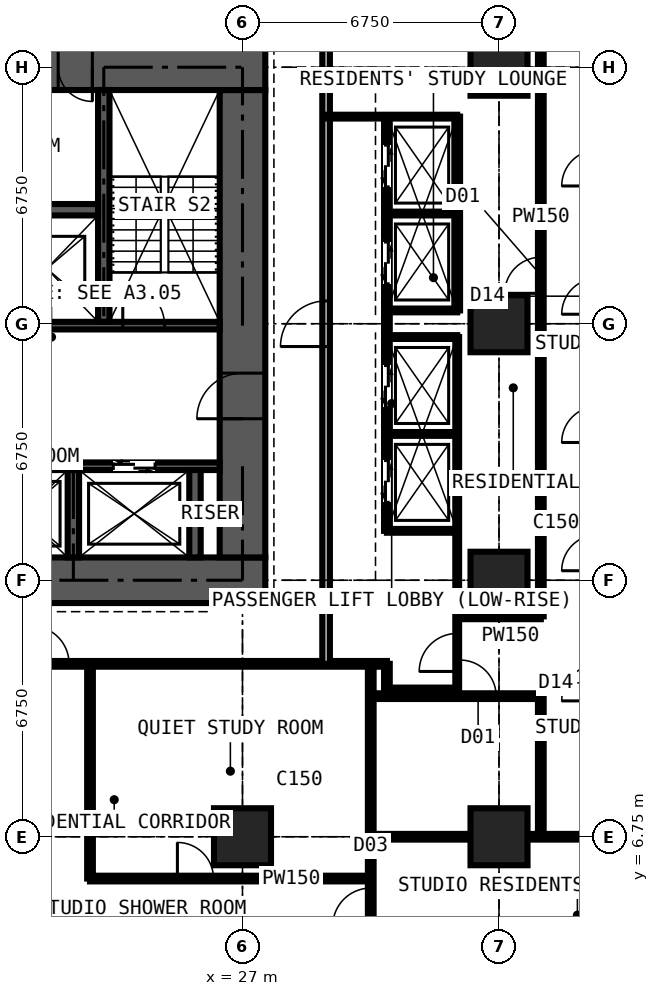
"""IFC4 building model, lengths in metres.
Left out: names, types, materials, properties, quantities, classifications, styles, units other than length and angle.
Written with IfcOpenShell. Run it as: python <this file> out.ifc"""

import sys

from ifc_helpers import new_model, si_unit, direction, frame, frame_2d, origin, origin_2d, place, context, subcontext, project, spatial, rectangle, extrude, element, fill, save


model = new_model("IFC4")
c1 = context("Model", 3, precision=1e-05, world=origin(), true_north=direction((0.0, 1.0)))
c2 = subcontext(c1, "Body", "Model", "MODEL_VIEW")
j1 = project(units=[si_unit("LENGTHUNIT", "METRE"), si_unit("PLANEANGLEUNIT", "RADIAN")], contexts=[c1])
p1 = place(None, origin())
s1 = spatial("IfcSite", under=j1, at=p1, CompositionType="ELEMENT")
p2 = place(p1, origin())
s2 = spatial("IfcBuilding", under=s1, at=p2, CompositionType="ELEMENT")
p3 = place(p2, frame((0.0, 0.0, 130.5)))
s3 = spatial("IfcBuildingStorey", under=s2, at=p3, CompositionType="ELEMENT", Elevation=130.5)
for number, where, z_axis, x_axis in (
    (1, (27.0, 6.75, 0.0), (0.0, 0.0, 1.0), (1.0, 0.0, 0.0)),
    (2, (33.75, 6.75, 0.0), (0.0, 0.0, 1.0), (1.0, 0.0, 0.0)),
    (3, (33.75, 13.5, 0.0), (0.0, 0.0, 1.0), (1.0, 0.0, 0.0)),
    (4, (33.75, 20.25, 0.0), (0.0, 0.0, 1.0), (1.0, 0.0, 0.0)),
    (5, (33.75, 27.0, 0.0), (0.0, 0.0, 1.0), (1.0, 0.0, 0.0)),
):
    element("IfcColumn", number, at=place(p3, frame(where, z_axis=z_axis, x_axis=x_axis)), inside=s3, PredefinedType="COLUMN", context=c2, shape_type="SweptSolid", body=[
        extrude(rectangle(XDim=1.5, YDim=1.5, at=origin_2d()), origin(), (0.0, 0.0, 1.0), 3.6),
    ])
p4 = place(p3, frame((12.9, 13.5, 0.0), z_axis=(0.0, 0.0, 1.0), x_axis=(1.0, 0.0, 0.0)))
e6 = element("IfcWall", 6, at=p4, inside=s3, PredefinedType="SHEAR", context=c2, shape_type="SweptSolid", body=[
    extrude(rectangle(XDim=14.7, YDim=1.2, at=frame_2d((7.35, 0.0))), origin(), (0.0, 0.0, 1.0), 3.6),
])
p5 = place(p3, frame((27.0, 14.1, 0.0), z_axis=(0.0, 0.0, 1.0), x_axis=(0.0, 1.0, 0.0)))
e7 = element("IfcWall", 7, at=p5, inside=s3, PredefinedType="SHEAR", context=c2, shape_type="SweptSolid", body=[
    extrude(rectangle(XDim=12.3, YDim=1.2, at=frame_2d((6.15, 0.0))), origin(), (0.0, 0.0, 1.0), 3.6),
])
p6 = place(p5, frame((3.65, 0.0, 0.0)))
e8 = element("IfcOpeningElement", 8, at=p6, cuts=e7, PredefinedType="OPENING", context=c2, shape_type="SweptSolid", body=[
    extrude(rectangle(XDim=1.2, YDim=2.2, at=frame_2d((0.6, 1.1))), frame((0.0, 0.61, 0.0), z_axis=(0.0, -1.0, 0.0), x_axis=(1.0, 0.0, 0.0)), (0.0, 0.0, 1.0), 1.22),
])
p7 = place(p3, frame((27.6, 27.0, 0.0), z_axis=(0.0, 0.0, 1.0), x_axis=(-1.0, 0.0, 0.0)))
e9 = element("IfcWall", 9, at=p7, inside=s3, PredefinedType="SHEAR", context=c2, shape_type="SweptSolid", body=[
    extrude(rectangle(XDim=14.7, YDim=1.2, at=frame_2d((7.35, 0.0))), origin(), (0.0, 0.0, 1.0), 3.6),
])
p8 = place(p7, frame((4.55, 0.0, 0.0)))
e10 = element("IfcOpeningElement", 10, at=p8, cuts=e9, PredefinedType="OPENING", context=c2, shape_type="SweptSolid", body=[
    extrude(rectangle(XDim=0.9, YDim=2.2, at=frame_2d((0.45, 1.1))), frame((0.0, 0.61, 0.0), z_axis=(0.0, -1.0, 0.0), x_axis=(1.0, 0.0, 0.0)), (0.0, 0.0, 1.0), 1.22),
])
p9 = place(p7, frame((7.525, 0.0, 0.0)))
e11 = element("IfcOpeningElement", 11, at=p9, cuts=e9, PredefinedType="OPENING", context=c2, shape_type="SweptSolid", body=[
    extrude(rectangle(XDim=1.0, YDim=2.2, at=frame_2d((0.5, 1.1))), frame((0.0, 0.61, 0.0), z_axis=(0.0, -1.0, 0.0), x_axis=(1.0, 0.0, 0.0)), (0.0, 0.0, 1.0), 1.22),
])
p10 = place(p3, frame((14.1, 16.5, 0.0), z_axis=(0.0, 0.0, 1.0), x_axis=(1.0, 0.0, 0.0)))
e12 = element("IfcWall", 12, at=p10, inside=s3, PredefinedType="SHEAR", context=c2, shape_type="SweptSolid", body=[
    extrude(rectangle(XDim=12.3, YDim=0.2, at=frame_2d((6.15, 0.0))), origin(), (0.0, 0.0, 1.0), 3.6),
])
p11 = place(p10, frame((0.9, 0.0, 0.0)))
e13 = element("IfcOpeningElement", 13, at=p11, cuts=e12, PredefinedType="OPENING", context=c2, shape_type="SweptSolid", body=[
    extrude(rectangle(XDim=1.1, YDim=2.2, at=frame_2d((0.55, 1.1))), frame((0.0, 0.11, 0.0), z_axis=(0.0, -1.0, 0.0), x_axis=(1.0, 0.0, 0.0)), (0.0, 0.0, 1.0), 0.22),
])
p12 = place(p10, frame((9.5, 0.0, 0.0)))
e14 = element("IfcOpeningElement", 14, at=p12, cuts=e12, PredefinedType="OPENING", context=c2, shape_type="SweptSolid", body=[
    extrude(rectangle(XDim=1.1, YDim=2.2, at=frame_2d((0.55, 1.1))), frame((0.0, 0.11, 0.0), z_axis=(0.0, -1.0, 0.0), x_axis=(1.0, 0.0, 0.0)), (0.0, 0.0, 1.0), 0.22),
])
p13 = place(p3, frame((14.1, 20.2, 0.0), z_axis=(0.0, 0.0, 1.0), x_axis=(1.0, 0.0, 0.0)))
e15 = element("IfcWall", 15, at=p13, inside=s3, PredefinedType="SHEAR", context=c2, shape_type="SweptSolid", body=[
    extrude(rectangle(XDim=12.3, YDim=0.2, at=frame_2d((6.15, 0.0))), origin(), (0.0, 0.0, 1.0), 3.6),
])
p14 = place(p13, frame((0.35, 0.0, 0.0)))
e16 = element("IfcOpeningElement", 16, at=p14, cuts=e15, PredefinedType="OPENING", context=c2, shape_type="SweptSolid", body=[
    extrude(rectangle(XDim=1.1, YDim=2.2, at=frame_2d((0.55, 1.1))), frame((0.0, 0.11, 0.0), z_axis=(0.0, -1.0, 0.0), x_axis=(1.0, 0.0, 0.0)), (0.0, 0.0, 1.0), 0.22),
])
p15 = place(p13, frame((9.75, 0.0, 0.0)))
e17 = element("IfcOpeningElement", 17, at=p15, cuts=e15, PredefinedType="OPENING", context=c2, shape_type="SweptSolid", body=[
    extrude(rectangle(XDim=1.1, YDim=2.2, at=frame_2d((0.55, 1.1))), frame((0.0, 0.11, 0.0), z_axis=(0.0, -1.0, 0.0), x_axis=(1.0, 0.0, 0.0)), (0.0, 0.0, 1.0), 0.22),
])
p16 = place(p3, frame((23.35, 20.3, 0.0), z_axis=(0.0, 0.0, 1.0), x_axis=(0.0, 1.0, 0.0)))
e18 = element("IfcWall", 18, at=p16, inside=s3, PredefinedType="SHEAR", context=c2, shape_type="SweptSolid", body=[
    extrude(rectangle(XDim=6.1, YDim=0.3, at=frame_2d((3.05, 0.0))), origin(), (0.0, 0.0, 1.0), 3.6),
])
p17 = place(p3, frame((17.3, 23.25, 0.0), z_axis=(0.0, 0.0, 1.0), x_axis=(1.0, 0.0, 0.0)))
e19 = element("IfcWall", 19, at=p17, inside=s3, PredefinedType="SHEAR", context=c2, shape_type="SweptSolid", body=[
    extrude(rectangle(XDim=5.9, YDim=0.3, at=frame_2d((2.95, 0.0))), origin(), (0.0, 0.0, 1.0), 3.6),
])
for number, where, z_axis, x_axis in (
    (20, (22.55, 14.1, 0.0), (0.0, 0.0, 1.0), (0.0, 1.0, 0.0)),
    (21, (25.75, 14.1, 0.0), (0.0, 0.0, 1.0), (0.0, 1.0, 0.0)),
):
    element("IfcWall", number, at=place(p3, frame(where, z_axis=z_axis, x_axis=x_axis)), inside=s3, PredefinedType="SHEAR", context=c2, shape_type="SweptSolid", body=[
        extrude(rectangle(XDim=2.3, YDim=0.3, at=frame_2d((1.15, 0.0))), origin(), (0.0, 0.0, 1.0), 3.6),
    ])
p18 = place(p3, frame((10.125, 11.3, 0.0), z_axis=(0.0, 0.0, 1.0), x_axis=(1.0, 0.0, 0.0)))
e22 = element("IfcWall", 22, at=p18, inside=s3, PredefinedType="PARTITIONING", context=c2, shape_type="SweptSolid", body=[
    extrude(rectangle(XDim=20.675, YDim=0.15, at=frame_2d((10.337, 0.0))), origin(), (0.0, 0.0, 1.0), 3.375),
])
p19 = place(p18, frame((5.2, 0.0, 0.0)))
e23 = element("IfcOpeningElement", 23, at=p19, cuts=e22, PredefinedType="OPENING", context=c2, shape_type="SweptSolid", body=[
    extrude(rectangle(XDim=1.0, YDim=2.2, at=frame_2d((0.5, 1.1))), frame((0.0, 0.085, 0.0), z_axis=(0.0, -1.0, 0.0), x_axis=(1.0, 0.0, 0.0)), (0.0, 0.0, 1.0), 0.17),
])
p20 = place(p18, frame((11.312, 0.0, 0.0)))
e24 = element("IfcOpeningElement", 24, at=p20, cuts=e22, PredefinedType="OPENING", context=c2, shape_type="SweptSolid", body=[
    extrude(rectangle(XDim=1.0, YDim=2.2, at=frame_2d((0.5, 1.1))), frame((0.0, 0.085, 0.0), z_axis=(0.0, -1.0, 0.0), x_axis=(1.0, 0.0, 0.0)), (0.0, 0.0, 1.0), 0.17),
])
p21 = place(p18, frame((3.225, 0.0, 0.0)))
e25 = element("IfcOpeningElement", 25, at=p21, cuts=e22, PredefinedType="OPENING", context=c2, shape_type="SweptSolid", body=[
    extrude(rectangle(XDim=0.95, YDim=2.2, at=frame_2d((0.475, 1.1))), frame((0.0, 0.085, 0.0), z_axis=(0.0, -1.0, 0.0), x_axis=(1.0, 0.0, 0.0)), (0.0, 0.0, 1.0), 0.17),
])
p22 = place(p3, frame((22.988, 5.65, 0.0), z_axis=(0.0, 0.0, 1.0), x_axis=(1.0, 0.0, 0.0)))
e26 = element("IfcWall", 26, at=p22, inside=s3, PredefinedType="PARTITIONING", context=c2, shape_type="SweptSolid", body=[
    extrude(rectangle(XDim=7.387, YDim=0.15, at=frame_2d((3.694, 0.0))), origin(), (0.0, 0.0, 1.0), 3.375),
])
p23 = place(p22, frame((2.3, 0.0, 0.0)))
e27 = element("IfcOpeningElement", 27, at=p23, cuts=e26, PredefinedType="OPENING", context=c2, shape_type="SweptSolid", body=[
    extrude(rectangle(XDim=0.95, YDim=2.2, at=frame_2d((0.475, 1.1))), frame((0.0, 0.085, 0.0), z_axis=(0.0, -1.0, 0.0), x_axis=(1.0, 0.0, 0.0)), (0.0, 0.0, 1.0), 0.17),
])
p24 = place(p3, frame((22.988, 5.65, 0.0), z_axis=(0.0, 0.0, 1.0), x_axis=(0.0, 1.0, 0.0)))
e28 = element("IfcWall", 28, at=p24, inside=s3, PredefinedType="PARTITIONING", context=c2, shape_type="SweptSolid", body=[
    extrude(rectangle(XDim=5.65, YDim=0.15, at=frame_2d((2.825, 0.0))), origin(), (0.0, 0.0, 1.0), 3.375),
])
p25 = place(p3, frame((29.2, 11.3, 0.0), z_axis=(0.0, 0.0, 1.0), x_axis=(0.0, 1.0, 0.0)))
e29 = element("IfcWall", 29, at=p25, inside=s3, PredefinedType="PARTITIONING", context=c2, shape_type="SweptSolid", body=[
    extrude(rectangle(XDim=17.9, YDim=0.2, at=frame_2d((8.95, 0.0))), origin(), (0.0, 0.0, 1.0), 3.375),
])
p26 = place(p25, frame((8.35, 0.0, 0.0)))
e30 = element("IfcOpeningElement", 30, at=p26, cuts=e29, PredefinedType="OPENING", context=c2, shape_type="SweptSolid", body=[
    extrude(rectangle(XDim=1.2, YDim=2.2, at=frame_2d((0.6, 1.1))), frame((0.0, 0.11, 0.0), z_axis=(0.0, -1.0, 0.0), x_axis=(1.0, 0.0, 0.0)), (0.0, 0.0, 1.0), 0.22),
])
p27 = place(p3, frame((29.2, 25.7, 0.0), z_axis=(0.0, 0.0, 1.0), x_axis=(1.0, 0.0, 0.0)))
e31 = element("IfcWall", 31, at=p27, inside=s3, PredefinedType="SHEAR", context=c2, shape_type="SweptSolid", body=[
    extrude(rectangle(XDim=3.45, YDim=0.1, at=frame_2d((1.725, 0.0))), origin(), (0.0, 0.0, 1.0), 3.375),
])
p28 = place(p3, frame((30.375, -0.734, 0.0), z_axis=(0.0, 0.0, 1.0), x_axis=(0.0, 1.0, 0.0)))
e32 = element("IfcWall", 32, at=p28, inside=s3, PredefinedType="PARTITIONING", context=c2, shape_type="SweptSolid", body=[
    extrude(rectangle(XDim=12.034, YDim=0.15, at=frame_2d((6.017, 0.0))), origin(), (0.0, 0.0, 1.0), 3.375),
])
p29 = place(p28, frame((5.134, 0.0, 0.0)))
e33 = element("IfcOpeningElement", 33, at=p29, cuts=e32, PredefinedType="OPENING", context=c2, shape_type="SweptSolid", body=[
    extrude(rectangle(XDim=1.0, YDim=2.2, at=frame_2d((0.5, 1.1))), frame((0.0, 0.085, 0.0), z_axis=(0.0, -1.0, 0.0), x_axis=(1.0, 0.0, 0.0)), (0.0, 0.0, 1.0), 0.17),
])
p30 = place(p3, frame((30.375, 6.75, 0.0), z_axis=(0.0, 0.0, 1.0), x_axis=(1.0, 0.0, 0.0)))
e34 = element("IfcWall", 34, at=p30, inside=s3, PredefinedType="PARTITIONING", context=c2, shape_type="SweptSolid", body=[
    extrude(rectangle(XDim=5.975, YDim=0.15, at=frame_2d((2.988, 0.0))), origin(), (0.0, 0.0, 1.0), 2.877),
])
p31 = place(p3, frame((30.375, 10.45, 0.0), z_axis=(0.0, 0.0, 1.0), x_axis=(1.0, 0.0, 0.0)))
e35 = element("IfcWall", 35, at=p31, inside=s3, PredefinedType="PARTITIONING", context=c2, shape_type="SweptSolid", body=[
    extrude(rectangle(XDim=4.475, YDim=0.15, at=frame_2d((2.238, 0.0))), origin(), (0.0, 0.0, 1.0), 3.375),
])
p32 = place(p31, frame((2.35, 0.0, 0.0)))
e36 = element("IfcOpeningElement", 36, at=p32, cuts=e35, PredefinedType="OPENING", context=c2, shape_type="SweptSolid", body=[
    extrude(rectangle(XDim=0.95, YDim=2.2, at=frame_2d((0.475, 1.1))), frame((0.0, 0.085, 0.0), z_axis=(0.0, -1.0, 0.0), x_axis=(1.0, 0.0, 0.0)), (0.0, 0.0, 1.0), 0.17),
])
p33 = place(p3, frame((30.8, 10.6, 0.0), z_axis=(0.0, 0.0, 1.0), x_axis=(0.0, 1.0, 0.0)))
e37 = element("IfcWall", 37, at=p33, inside=s3, PredefinedType="PARTITIONING", context=c2, shape_type="SweptSolid", body=[
    extrude(rectangle(XDim=0.7, YDim=0.15, at=frame_2d((0.35, 0.0))), origin(), (0.0, 0.0, 1.0), 3.375),
])
p34 = place(p3, frame((30.8, 10.6, 0.0), z_axis=(0.0, 0.0, 1.0), x_axis=(1.0, 0.0, 0.0)))
e38 = element("IfcWall", 38, at=p34, inside=s3, PredefinedType="PARTITIONING", context=c2, shape_type="SweptSolid", body=[
    extrude(rectangle(XDim=1.85, YDim=0.15, at=frame_2d((0.925, 0.0))), origin(), (0.0, 0.0, 1.0), 3.375),
])
p35 = place(p3, frame((30.8, 14.8, 0.0), z_axis=(0.0, 0.0, 1.0), x_axis=(0.0, 1.0, 0.0)))
e39 = element("IfcWall", 39, at=p35, inside=s3, PredefinedType="PARTITIONING", context=c2, shape_type="SweptSolid", body=[
    extrude(rectangle(XDim=10.9, YDim=0.15, at=frame_2d((5.45, 0.0))), origin(), (0.0, 0.0, 1.0), 3.375),
])
p36 = place(p35, frame((0.75, 0.0, 0.0)))
e40 = element("IfcOpeningElement", 40, at=p36, cuts=e39, PredefinedType="OPENING", context=c2, shape_type="SweptSolid", body=[
    extrude(rectangle(XDim=1.1, YDim=2.2, at=frame_2d((0.55, 1.1))), frame((0.0, 0.085, 0.0), z_axis=(0.0, -1.0, 0.0), x_axis=(1.0, 0.0, 0.0)), (0.0, 0.0, 1.0), 0.17),
])
p37 = place(p35, frame((3.25, 0.0, 0.0)))
e41 = element("IfcOpeningElement", 41, at=p37, cuts=e39, PredefinedType="OPENING", context=c2, shape_type="SweptSolid", body=[
    extrude(rectangle(XDim=1.1, YDim=2.2, at=frame_2d((0.55, 1.1))), frame((0.0, 0.085, 0.0), z_axis=(0.0, -1.0, 0.0), x_axis=(1.0, 0.0, 0.0)), (0.0, 0.0, 1.0), 0.17),
])
p38 = place(p35, frame((6.5, 0.0, 0.0)))
e42 = element("IfcOpeningElement", 42, at=p38, cuts=e39, PredefinedType="OPENING", context=c2, shape_type="SweptSolid", body=[
    extrude(rectangle(XDim=1.1, YDim=2.2, at=frame_2d((0.55, 1.1))), frame((0.0, 0.085, 0.0), z_axis=(0.0, -1.0, 0.0), x_axis=(1.0, 0.0, 0.0)), (0.0, 0.0, 1.0), 0.17),
])
p39 = place(p35, frame((9.05, 0.0, 0.0)))
e43 = element("IfcOpeningElement", 43, at=p39, cuts=e39, PredefinedType="OPENING", context=c2, shape_type="SweptSolid", body=[
    extrude(rectangle(XDim=1.1, YDim=2.2, at=frame_2d((0.55, 1.1))), frame((0.0, 0.085, 0.0), z_axis=(0.0, -1.0, 0.0), x_axis=(1.0, 0.0, 0.0)), (0.0, 0.0, 1.0), 0.17),
])
for number, where, z_axis, x_axis in (
    (44, (30.8, 14.8, 0.0), (0.0, 0.0, 1.0), (1.0, 0.0, 0.0)),
    (45, (30.8, 17.35, 0.0), (0.0, 0.0, 1.0), (1.0, 0.0, 0.0)),
    (46, (30.8, 19.9, 0.0), (0.0, 0.0, 1.0), (1.0, 0.0, 0.0)),
    (47, (30.8, 20.6, 0.0), (0.0, 0.0, 1.0), (1.0, 0.0, 0.0)),
    (48, (30.8, 23.15, 0.0), (0.0, 0.0, 1.0), (1.0, 0.0, 0.0)),
):
    element("IfcWall", number, at=place(p3, frame(where, z_axis=z_axis, x_axis=x_axis)), inside=s3, PredefinedType="SHEAR", context=c2, shape_type="SweptSolid", body=[
        extrude(rectangle(XDim=1.85, YDim=0.1, at=frame_2d((0.925, 0.0))), origin(), (0.0, 0.0, 1.0), 3.375),
    ])
p40 = place(p3, frame((32.65, 10.6, 0.0), z_axis=(0.0, 0.0, 1.0), x_axis=(0.0, 1.0, 0.0)))
e49 = element("IfcWall", 49, at=p40, inside=s3, PredefinedType="SHEAR", context=c2, shape_type="SweptSolid", body=[
    extrude(rectangle(XDim=9.3, YDim=0.1, at=frame_2d((4.65, 0.0))), origin(), (0.0, 0.0, 1.0), 3.375),
])
p41 = place(p40, frame((0.5, 0.0, 0.0)))
e50 = element("IfcOpeningElement", 50, at=p41, cuts=e49, PredefinedType="OPENING", context=c2, shape_type="SweptSolid", body=[
    extrude(rectangle(XDim=1.0, YDim=2.2, at=frame_2d((0.5, 1.1))), frame((0.0, 0.06, 0.0), z_axis=(0.0, -1.0, 0.0), x_axis=(1.0, 0.0, 0.0)), (0.0, 0.0, 1.0), 0.12),
])
p42 = place(p3, frame((32.65, 12.55, 0.0), z_axis=(0.0, 0.0, 1.0), x_axis=(1.0, 0.0, 0.0)))
e51 = element("IfcWall", 51, at=p42, inside=s3, PredefinedType="PARTITIONING", context=c2, shape_type="SweptSolid", body=[
    extrude(rectangle(XDim=2.2, YDim=0.15, at=frame_2d((1.1, 0.0))), origin(), (0.0, 0.0, 1.0), 3.375),
])
p43 = place(p3, frame((32.65, 20.6, 0.0), z_axis=(0.0, 0.0, 1.0), x_axis=(0.0, 1.0, 0.0)))
e52 = element("IfcWall", 52, at=p43, inside=s3, PredefinedType="PARTITIONING", context=c2, shape_type="SweptSolid", body=[
    extrude(rectangle(XDim=5.1, YDim=0.15, at=frame_2d((2.55, 0.0))), origin(), (0.0, 0.0, 1.0), 3.375),
])
p44 = place(p3, frame((34.85, 6.75, 0.0), z_axis=(0.0, 0.0, 1.0), x_axis=(0.0, 1.0, 0.0)))
e53 = element("IfcWall", 53, at=p44, inside=s3, PredefinedType="PARTITIONING", context=c2, shape_type="SweptSolid", body=[
    extrude(rectangle(XDim=3.7, YDim=0.15, at=frame_2d((1.85, 0.0))), origin(), (0.0, 0.0, 1.0), 3.375),
])
p45 = place(p3, frame((34.85, 12.55, 0.0), z_axis=(0.0, 0.0, 1.0), x_axis=(0.0, 1.0, 0.0)))
e54 = element("IfcWall", 54, at=p45, inside=s3, PredefinedType="PARTITIONING", context=c2, shape_type="SweptSolid", body=[
    extrude(rectangle(XDim=17.825, YDim=0.15, at=frame_2d((8.913, 0.0))), origin(), (0.0, 0.0, 1.0), 3.375),
])
p46 = place(p45, frame((8.5, 0.0, 0.0)))
e55 = element("IfcOpeningElement", 55, at=p46, cuts=e54, PredefinedType="OPENING", context=c2, shape_type="SweptSolid", body=[
    extrude(rectangle(XDim=0.95, YDim=2.2, at=frame_2d((0.475, 1.1))), frame((0.0, 0.085, 0.0), z_axis=(0.0, -1.0, 0.0), x_axis=(1.0, 0.0, 0.0)), (0.0, 0.0, 1.0), 0.17),
])
p47 = place(p12, origin())
e56 = element("IfcDoor", 56, at=p47, inside=s3, OperationType="DOUBLE_DOOR_SLIDING", PredefinedType="DOOR", context=c2, shape_type="SweptSolid", body=[
    extrude(rectangle(XDim=1.1, YDim=2.2, at=frame_2d((0.55, 1.1))), frame((0.0, 0.025, 0.0), z_axis=(0.0, -1.0, 0.0), x_axis=(1.0, 0.0, 0.0)), (0.0, 0.0, 1.0), 0.05),
])
fill(e14, e56)
p48 = place(p6, origin())
e57 = element("IfcDoor", 57, at=p48, inside=s3, OperationType="DOUBLE_DOOR_SINGLE_SWING", PredefinedType="DOOR", context=c2, shape_type="SweptSolid", body=[
    extrude(rectangle(XDim=1.2, YDim=2.2, at=frame_2d((0.6, 1.1))), frame((0.0, 0.025, 0.0), z_axis=(0.0, -1.0, 0.0), x_axis=(1.0, 0.0, 0.0)), (0.0, 0.0, 1.0), 0.05),
])
fill(e8, e57)
p49 = place(p8, origin())
e58 = element("IfcDoor", 58, at=p49, inside=s3, OperationType="SINGLE_SWING_LEFT", PredefinedType="DOOR", context=c2, shape_type="SweptSolid", body=[
    extrude(rectangle(XDim=0.9, YDim=2.2, at=frame_2d((0.45, 1.1))), frame((0.0, 0.4, 0.0), z_axis=(0.0, -1.0, 0.0), x_axis=(1.0, 0.0, 0.0)), (0.0, 0.0, 1.0), 0.8),
])
fill(e10, e58)
p50 = place(p15, origin())
e59 = element("IfcDoor", 59, at=p50, inside=s3, OperationType="SINGLE_SWING_LEFT", PredefinedType="DOOR", context=c2, shape_type="SweptSolid", body=[
    extrude(rectangle(XDim=1.1, YDim=2.2, at=frame_2d((0.55, 1.1))), frame((0.0, 0.025, 0.0), z_axis=(0.0, -1.0, 0.0), x_axis=(1.0, 0.0, 0.0)), (0.0, 0.0, 1.0), 0.05),
])
fill(e17, e59)
p51 = place(p20, origin())
e60 = element("IfcDoor", 60, at=p51, inside=s3, OperationType="SINGLE_SWING_LEFT", PredefinedType="DOOR", context=c2, shape_type="SweptSolid", body=[
    extrude(rectangle(XDim=1.0, YDim=2.2, at=frame_2d((0.5, 1.1))), frame((0.0, 0.025, 0.0), z_axis=(0.0, -1.0, 0.0), x_axis=(1.0, 0.0, 0.0)), (0.0, 0.0, 1.0), 0.05),
])
fill(e24, e60)
p52 = place(p23, origin())
e61 = element("IfcDoor", 61, at=p52, inside=s3, OperationType="SINGLE_SWING_LEFT", PredefinedType="DOOR", context=c2, shape_type="SweptSolid", body=[
    extrude(rectangle(XDim=0.95, YDim=2.2, at=frame_2d((0.475, 1.1))), frame((0.0, 0.025, 0.0), z_axis=(0.0, -1.0, 0.0), x_axis=(1.0, 0.0, 0.0)), (0.0, 0.0, 1.0), 0.05),
])
fill(e27, e61)
p53 = place(p29, origin())
e62 = element("IfcDoor", 62, at=p53, inside=s3, OperationType="SINGLE_SWING_LEFT", PredefinedType="DOOR", context=c2, shape_type="SweptSolid", body=[
    extrude(rectangle(XDim=1.0, YDim=2.2, at=frame_2d((0.5, 1.1))), frame((0.0, 0.025, 0.0), z_axis=(0.0, -1.0, 0.0), x_axis=(1.0, 0.0, 0.0)), (0.0, 0.0, 1.0), 0.05),
])
fill(e33, e62)
p54 = place(p41, origin())
e63 = element("IfcDoor", 63, at=p54, inside=s3, OperationType="SINGLE_SWING_LEFT", PredefinedType="DOOR", context=c2, shape_type="SweptSolid", body=[
    extrude(rectangle(XDim=1.0, YDim=2.2, at=frame_2d((0.5, 1.1))), frame((0.0, 0.025, 0.0), z_axis=(0.0, -1.0, 0.0), x_axis=(1.0, 0.0, 0.0)), (0.0, 0.0, 1.0), 0.05),
])
fill(e50, e63)
p55 = place(p46, origin())
e64 = element("IfcDoor", 64, at=p55, inside=s3, OperationType="SINGLE_SWING_LEFT", PredefinedType="DOOR", context=c2, shape_type="SweptSolid", body=[
    extrude(rectangle(XDim=0.95, YDim=2.2, at=frame_2d((0.475, 1.1))), frame((0.0, 0.025, 0.0), z_axis=(0.0, -1.0, 0.0), x_axis=(1.0, 0.0, 0.0)), (0.0, 0.0, 1.0), 0.05),
])
fill(e55, e64)
p56 = place(p32, origin())
e65 = element("IfcDoor", 65, at=p56, inside=s3, OperationType="SINGLE_SWING_LEFT", PredefinedType="DOOR", context=c2, shape_type="SweptSolid", body=[
    extrude(rectangle(XDim=0.95, YDim=2.2, at=frame_2d((0.475, 1.1))), frame((0.0, 0.025, 0.0), z_axis=(0.0, -1.0, 0.0), x_axis=(1.0, 0.0, 0.0)), (0.0, 0.0, 1.0), 0.05),
])
fill(e36, e65)
p57 = place(p36, origin())
e66 = element("IfcDoor", 66, at=p57, inside=s3, OperationType="DOUBLE_DOOR_SLIDING", PredefinedType="DOOR", context=c2, shape_type="SweptSolid", body=[
    extrude(rectangle(XDim=1.1, YDim=2.2, at=frame_2d((0.55, 1.1))), frame((0.0, 0.025, 0.0), z_axis=(0.0, -1.0, 0.0), x_axis=(1.0, 0.0, 0.0)), (0.0, 0.0, 1.0), 0.05),
])
fill(e40, e66)
p58 = place(p37, origin())
e67 = element("IfcDoor", 67, at=p58, inside=s3, OperationType="DOUBLE_DOOR_SLIDING", PredefinedType="DOOR", context=c2, shape_type="SweptSolid", body=[
    extrude(rectangle(XDim=1.1, YDim=2.2, at=frame_2d((0.55, 1.1))), frame((0.0, 0.025, 0.0), z_axis=(0.0, -1.0, 0.0), x_axis=(1.0, 0.0, 0.0)), (0.0, 0.0, 1.0), 0.05),
])
fill(e41, e67)
p59 = place(p38, origin())
e68 = element("IfcDoor", 68, at=p59, inside=s3, OperationType="DOUBLE_DOOR_SLIDING", PredefinedType="DOOR", context=c2, shape_type="SweptSolid", body=[
    extrude(rectangle(XDim=1.1, YDim=2.2, at=frame_2d((0.55, 1.1))), frame((0.0, 0.025, 0.0), z_axis=(0.0, -1.0, 0.0), x_axis=(1.0, 0.0, 0.0)), (0.0, 0.0, 1.0), 0.05),
])
fill(e42, e68)
p60 = place(p39, origin())
e69 = element("IfcDoor", 69, at=p60, inside=s3, OperationType="DOUBLE_DOOR_SLIDING", PredefinedType="DOOR", context=c2, shape_type="SweptSolid", body=[
    extrude(rectangle(XDim=1.1, YDim=2.2, at=frame_2d((0.55, 1.1))), frame((0.0, 0.025, 0.0), z_axis=(0.0, -1.0, 0.0), x_axis=(1.0, 0.0, 0.0)), (0.0, 0.0, 1.0), 0.05),
])
fill(e43, e69)
p61 = place(p26, origin())
e70 = element("IfcDoor", 70, at=p61, inside=s3, OperationType="DOUBLE_DOOR_SINGLE_SWING", PredefinedType="DOOR", context=c2, shape_type="SweptSolid", body=[
    extrude(rectangle(XDim=1.2, YDim=2.2, at=frame_2d((0.6, 1.1))), frame((0.0, 0.025, 0.0), z_axis=(0.0, -1.0, 0.0), x_axis=(1.0, 0.0, 0.0)), (0.0, 0.0, 1.0), 0.05),
])
fill(e30, e70)
save(model, sys.argv[1])
